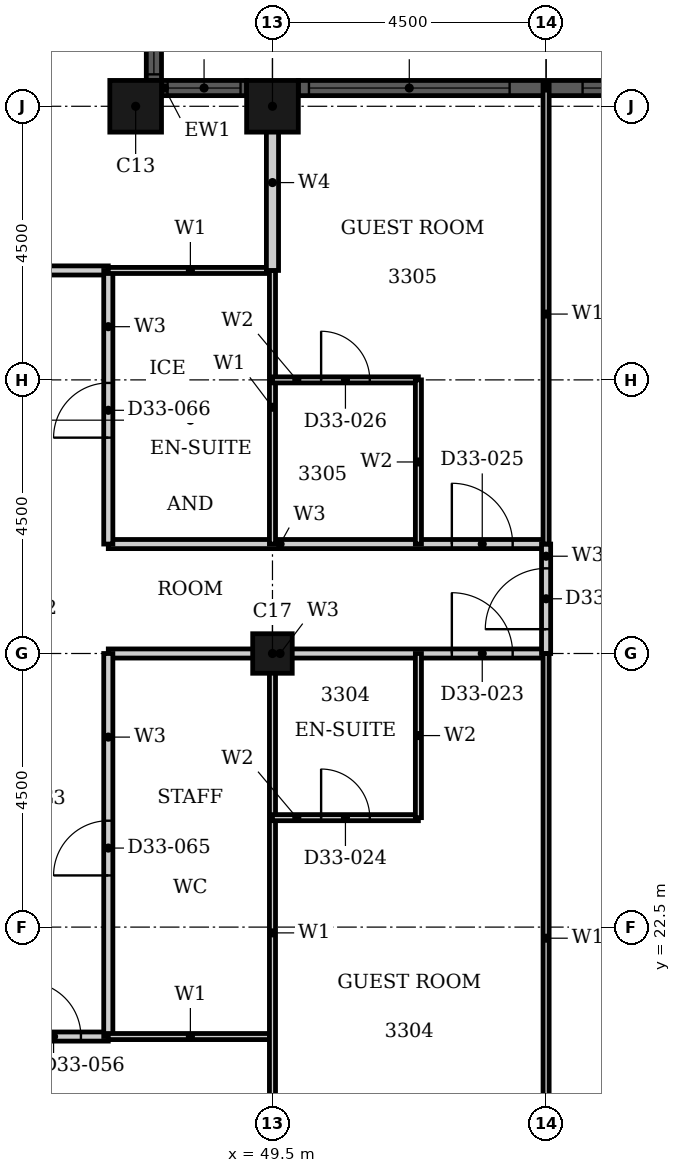
"""IFC4 building model, lengths in metres.
Left out: names, types, materials, properties, quantities, classifications, styles, units other than length and angle.
Written with IfcOpenShell. Run it as: python <this file> out.ifc"""

import sys

from ifc_helpers import new_model, si_unit, direction, frame, frame_2d, origin, origin_2d, place, context, subcontext, project, spatial, rectangle, hollow_rectangle, extrude, element, fill, save


model = new_model("IFC4")
c1 = context("Model", 3, precision=1e-05, world=origin(), true_north=direction((0.0, 1.0)))
c2 = subcontext(c1, "Body", "Model", "MODEL_VIEW")
j1 = project(units=[si_unit("LENGTHUNIT", "METRE"), si_unit("PLANEANGLEUNIT", "RADIAN")], contexts=[c1])
p1 = place(None, origin())
s1 = spatial("IfcSite", under=j1, at=p1, CompositionType="ELEMENT")
p2 = place(p1, origin())
s2 = spatial("IfcBuilding", under=s1, at=p2, CompositionType="ELEMENT")
p3 = place(p2, frame((0.0, 0.0, 133.2)))
s3 = spatial("IfcBuildingStorey", under=s2, at=p3, CompositionType="ELEMENT", Elevation=133.2)
for number, where, z_axis, x_axis in (
    (1, (49.5, 36.0, 0.0), (0.0, 0.0, 1.0), (1.0, 0.0, 0.0)),
    (2, (47.25, 36.0, 0.0), (0.0, 0.0, 1.0), (1.0, 0.0, 0.0)),
):
    element("IfcColumn", number, at=place(p3, frame(where, z_axis=z_axis, x_axis=x_axis)), inside=s3, PredefinedType="COLUMN", context=c2, shape_type="SweptSolid", body=[
        extrude(hollow_rectangle(XDim=0.85, YDim=0.85, WallThickness=0.026, at=origin_2d()), origin(), (0.0, 0.0, 1.0), 3.6),
    ])
p4 = place(p3, frame((49.5, 27.0, 0.0), z_axis=(0.0, 0.0, 1.0), x_axis=(1.0, 0.0, 0.0)))
e3 = element("IfcColumn", 3, at=p4, inside=s3, PredefinedType="COLUMN", context=c2, shape_type="SweptSolid", body=[
    extrude(hollow_rectangle(XDim=0.65, YDim=0.65, WallThickness=0.021, at=origin_2d()), origin(), (0.0, 0.0, 1.0), 3.6),
])
p5 = place(p3, frame((58.075, 36.3, 0.0), z_axis=(0.0, 0.0, 1.0), x_axis=(-1.0, 0.0, 0.0)))
e4 = element("IfcWall", 4, at=p5, inside=s3, PredefinedType="SOLIDWALL", context=c2, shape_type="SweptSolid", body=[
    extrude(rectangle(XDim=8.15, YDim=0.25, at=frame_2d((4.075, 0.0))), origin(), (0.0, 0.0, 1.0), 3.6),
])
p6 = place(p5, frame((0.175, 0.0, 0.9)))
e5 = element("IfcOpeningElement", 5, at=p6, cuts=e4, PredefinedType="OPENING", context=c2, shape_type="SweptSolid", body=[
    extrude(rectangle(XDim=3.3, YDim=2.08, at=frame_2d((1.65, 1.04))), frame((0.0, 0.135, 0.0), z_axis=(0.0, -1.0, 0.0), x_axis=(1.0, 0.0, 0.0)), (0.0, 0.0, 1.0), 0.27),
])
p7 = place(p5, frame((4.675, 0.0, 0.9)))
e6 = element("IfcOpeningElement", 6, at=p7, cuts=e4, PredefinedType="OPENING", context=c2, shape_type="SweptSolid", body=[
    extrude(rectangle(XDim=3.3, YDim=2.08, at=frame_2d((1.65, 1.04))), frame((0.0, 0.135, 0.0), z_axis=(0.0, -1.0, 0.0), x_axis=(1.0, 0.0, 0.0)), (0.0, 0.0, 1.0), 0.27),
])
p8 = place(p3, frame((49.075, 36.3, 0.0), z_axis=(0.0, 0.0, 1.0), x_axis=(-1.0, 0.0, 0.0)))
e7 = element("IfcWall", 7, at=p8, inside=s3, PredefinedType="SOLIDWALL", context=c2, shape_type="SweptSolid", body=[
    extrude(rectangle(XDim=1.4, YDim=0.25, at=frame_2d((0.7, 0.0))), origin(), (0.0, 0.0, 1.0), 3.6),
])
p9 = place(p8, frame((0.1, 0.0, 0.9)))
e8 = element("IfcOpeningElement", 8, at=p9, cuts=e7, PredefinedType="OPENING", context=c2, shape_type="SweptSolid", body=[
    extrude(rectangle(XDim=1.2, YDim=2.08, at=frame_2d((0.6, 1.04))), frame((0.0, 0.135, 0.0), z_axis=(0.0, -1.0, 0.0), x_axis=(1.0, 0.0, 0.0)), (0.0, 0.0, 1.0), 0.27),
])
p10 = place(p3, frame((47.55, 36.425, 0.0), z_axis=(0.0, 0.0, 1.0), x_axis=(0.0, 1.0, 0.0)))
e9 = element("IfcWall", 9, at=p10, inside=s3, PredefinedType="SOLIDWALL", context=c2, shape_type="SweptSolid", body=[
    extrude(rectangle(XDim=1.4, YDim=0.25, at=frame_2d((0.7, 0.0))), origin(), (0.0, 0.0, 1.0), 3.6),
])
p11 = place(p10, frame((0.1, 0.0, 0.9)))
e10 = element("IfcOpeningElement", 10, at=p11, cuts=e9, PredefinedType="OPENING", context=c2, shape_type="SweptSolid", body=[
    extrude(rectangle(XDim=1.2, YDim=2.08, at=frame_2d((0.6, 1.04))), frame((0.0, 0.135, 0.0), z_axis=(0.0, -1.0, 0.0), x_axis=(1.0, 0.0, 0.0)), (0.0, 0.0, 1.0), 0.27),
])
p12 = place(p3, frame((31.5, 20.7, 0.0), z_axis=(0.0, 0.0, 1.0), x_axis=(1.0, 0.0, 0.0)))
e11 = element("IfcWall", 11, at=p12, inside=s3, PredefinedType="PARTITIONING", context=c2, shape_type="SweptSolid", body=[
    extrude(rectangle(XDim=15.3, YDim=0.15, at=frame_2d((7.65, 0.0))), origin(), (0.0, 0.0, 1.0), 3.3),
])
p13 = place(p12, frame((11.95, 0.0, 0.0)))
e12 = element("IfcOpeningElement", 12, at=p13, cuts=e11, PredefinedType="OPENING", context=c2, shape_type="SweptSolid", body=[
    extrude(rectangle(XDim=1.0, YDim=2.1, at=frame_2d((0.5, 1.05))), frame((0.0, 0.085, 0.0), z_axis=(0.0, -1.0, 0.0), x_axis=(1.0, 0.0, 0.0)), (0.0, 0.0, 1.0), 0.17),
])
p14 = place(p12, frame((13.95, 0.0, 0.0)))
e13 = element("IfcOpeningElement", 13, at=p14, cuts=e11, PredefinedType="OPENING", context=c2, shape_type="SweptSolid", body=[
    extrude(rectangle(XDim=0.9, YDim=2.1, at=frame_2d((0.45, 1.05))), frame((0.0, 0.085, 0.0), z_axis=(0.0, -1.0, 0.0), x_axis=(1.0, 0.0, 0.0)), (0.0, 0.0, 1.0), 0.17),
])
p15 = place(p12, frame((1.05, 0.0, 0.0)))
e14 = element("IfcOpeningElement", 14, at=p15, cuts=e11, PredefinedType="OPENING", context=c2, shape_type="SweptSolid", body=[
    extrude(rectangle(XDim=0.9, YDim=2.1, at=frame_2d((0.45, 1.05))), frame((0.0, 0.085, 0.0), z_axis=(0.0, -1.0, 0.0), x_axis=(1.0, 0.0, 0.0)), (0.0, 0.0, 1.0), 0.17),
])
p16 = place(p12, frame((5.55, 0.0, 0.0)))
e15 = element("IfcOpeningElement", 15, at=p16, cuts=e11, PredefinedType="OPENING", context=c2, shape_type="SweptSolid", body=[
    extrude(rectangle(XDim=0.9, YDim=2.1, at=frame_2d((0.45, 1.05))), frame((0.0, 0.085, 0.0), z_axis=(0.0, -1.0, 0.0), x_axis=(1.0, 0.0, 0.0)), (0.0, 0.0, 1.0), 0.17),
])
p17 = place(p3, frame((46.8, 27.0, 0.0), z_axis=(0.0, 0.0, 1.0), x_axis=(1.0, 0.0, 0.0)))
e16 = element("IfcWall", 16, at=p17, inside=s3, PredefinedType="PARTITIONING", context=c2, shape_type="SweptSolid", body=[
    extrude(rectangle(XDim=7.2, YDim=0.15, at=frame_2d((3.6, 0.0))), origin(), (0.0, 0.0, 1.0), 2.58),
])
p18 = place(p17, frame((5.65, 0.0, 0.0)))
e17 = element("IfcOpeningElement", 17, at=p18, cuts=e16, PredefinedType="OPENING", context=c2, shape_type="SweptSolid", body=[
    extrude(rectangle(XDim=1.0, YDim=2.1, at=frame_2d((0.5, 1.05))), frame((0.0, 0.085, 0.0), z_axis=(0.0, -1.0, 0.0), x_axis=(1.0, 0.0, 0.0)), (0.0, 0.0, 1.0), 0.17),
])
p19 = place(p3, frame((46.8, 28.8, 0.0), z_axis=(0.0, 0.0, 1.0), x_axis=(1.0, 0.0, 0.0)))
e18 = element("IfcWall", 18, at=p19, inside=s3, PredefinedType="PARTITIONING", context=c2, shape_type="SweptSolid", body=[
    extrude(rectangle(XDim=7.2, YDim=0.15, at=frame_2d((3.6, 0.0))), origin(), (0.0, 0.0, 1.0), 3.3),
])
p20 = place(p19, frame((5.65, 0.0, 0.0)))
e19 = element("IfcOpeningElement", 19, at=p20, cuts=e18, PredefinedType="OPENING", context=c2, shape_type="SweptSolid", body=[
    extrude(rectangle(XDim=1.0, YDim=2.1, at=frame_2d((0.5, 1.05))), frame((0.0, 0.085, 0.0), z_axis=(0.0, -1.0, 0.0), x_axis=(1.0, 0.0, 0.0)), (0.0, 0.0, 1.0), 0.17),
])
p21 = place(p3, frame((33.3, 33.3, 0.0), z_axis=(0.0, 0.0, 1.0), x_axis=(1.0, 0.0, 0.0)))
e20 = element("IfcWall", 20, at=p21, inside=s3, PredefinedType="PARTITIONING", context=c2, shape_type="SweptSolid", body=[
    extrude(rectangle(XDim=13.5, YDim=0.15, at=frame_2d((6.75, 0.0))), origin(), (0.0, 0.0, 1.0), 3.3),
])
p22 = place(p21, frame((10.15, 0.0, 0.0)))
e21 = element("IfcOpeningElement", 21, at=p22, cuts=e20, PredefinedType="OPENING", context=c2, shape_type="SweptSolid", body=[
    extrude(rectangle(XDim=1.0, YDim=2.1, at=frame_2d((0.5, 1.05))), frame((0.0, 0.085, 0.0), z_axis=(0.0, -1.0, 0.0), x_axis=(1.0, 0.0, 0.0)), (0.0, 0.0, 1.0), 0.17),
])
p23 = place(p21, frame((0.75, 0.0, 0.0)))
e22 = element("IfcOpeningElement", 22, at=p23, cuts=e20, PredefinedType="OPENING", context=c2, shape_type="SweptSolid", body=[
    extrude(rectangle(XDim=0.9, YDim=2.1, at=frame_2d((0.45, 1.05))), frame((0.0, 0.085, 0.0), z_axis=(0.0, -1.0, 0.0), x_axis=(1.0, 0.0, 0.0)), (0.0, 0.0, 1.0), 0.17),
])
p24 = place(p21, frame((4.35, 0.0, 0.0)))
e23 = element("IfcOpeningElement", 23, at=p24, cuts=e20, PredefinedType="OPENING", context=c2, shape_type="SweptSolid", body=[
    extrude(rectangle(XDim=0.9, YDim=2.1, at=frame_2d((0.45, 1.05))), frame((0.0, 0.085, 0.0), z_axis=(0.0, -1.0, 0.0), x_axis=(1.0, 0.0, 0.0)), (0.0, 0.0, 1.0), 0.17),
])
p25 = place(p3, frame((46.8, 28.8, 0.0), z_axis=(0.0, 0.0, 1.0), x_axis=(0.0, 1.0, 0.0)))
e24 = element("IfcWall", 24, at=p25, inside=s3, PredefinedType="PARTITIONING", context=c2, shape_type="SweptSolid", body=[
    extrude(rectangle(XDim=4.5, YDim=0.15, at=frame_2d((2.25, 0.0))), origin(), (0.0, 0.0, 1.0), 3.3),
])
p26 = place(p25, frame((1.75, 0.0, 0.0)))
e25 = element("IfcOpeningElement", 25, at=p26, cuts=e24, PredefinedType="OPENING", context=c2, shape_type="SweptSolid", body=[
    extrude(rectangle(XDim=0.9, YDim=2.1, at=frame_2d((0.45, 1.05))), frame((0.0, 0.085, 0.0), z_axis=(0.0, -1.0, 0.0), x_axis=(1.0, 0.0, 0.0)), (0.0, 0.0, 1.0), 0.17),
])
p27 = place(p3, frame((46.8, 20.7, 0.0), z_axis=(0.0, 0.0, 1.0), x_axis=(0.0, 1.0, 0.0)))
e26 = element("IfcWall", 26, at=p27, inside=s3, PredefinedType="PARTITIONING", context=c2, shape_type="SweptSolid", body=[
    extrude(rectangle(XDim=6.3, YDim=0.15, at=frame_2d((3.15, 0.0))), origin(), (0.0, 0.0, 1.0), 3.3),
])
p28 = place(p27, frame((2.65, 0.0, 0.0)))
e27 = element("IfcOpeningElement", 27, at=p28, cuts=e26, PredefinedType="OPENING", context=c2, shape_type="SweptSolid", body=[
    extrude(rectangle(XDim=0.9, YDim=2.1, at=frame_2d((0.45, 1.05))), frame((0.0, 0.085, 0.0), z_axis=(0.0, -1.0, 0.0), x_axis=(1.0, 0.0, 0.0)), (0.0, 0.0, 1.0), 0.17),
])
p29 = place(p3, frame((54.0, 27.0, 0.0), z_axis=(0.0, 0.0, 1.0), x_axis=(0.0, 1.0, 0.0)))
e28 = element("IfcWall", 28, at=p29, inside=s3, PredefinedType="PARTITIONING", context=c2, shape_type="SweptSolid", body=[
    extrude(rectangle(XDim=1.8, YDim=0.15, at=frame_2d((0.9, 0.0))), origin(), (0.0, 0.0, 1.0), 3.3),
])
p30 = place(p29, frame((0.4, 0.0, 0.0)))
e29 = element("IfcOpeningElement", 29, at=p30, cuts=e28, PredefinedType="OPENING", context=c2, shape_type="SweptSolid", body=[
    extrude(rectangle(XDim=1.0, YDim=2.1, at=frame_2d((0.5, 1.05))), frame((0.0, 0.085, 0.0), z_axis=(0.0, -1.0, 0.0), x_axis=(1.0, 0.0, 0.0)), (0.0, 0.0, 1.0), 0.17),
])
for number, where, z_axis, x_axis in (
    (30, (46.8, 20.7, 0.0), (0.0, 0.0, 1.0), (1.0, 0.0, 0.0)),
    (31, (46.8, 33.3, 0.0), (0.0, 0.0, 1.0), (1.0, 0.0, 0.0)),
):
    element("IfcWall", number, at=place(p3, frame(where, z_axis=z_axis, x_axis=x_axis)), inside=s3, PredefinedType="PARTITIONING", context=c2, shape_type="SweptSolid", body=[
        extrude(rectangle(XDim=2.7, YDim=0.1, at=frame_2d((1.35, 0.0))), origin(), (0.0, 0.0, 1.0), 3.3),
    ])
p31 = place(p3, frame((49.5, 28.8, 0.0), z_axis=(0.0, 0.0, 1.0), x_axis=(0.0, 1.0, 0.0)))
e32 = element("IfcWall", 32, at=p31, inside=s3, PredefinedType="PARTITIONING", context=c2, shape_type="SweptSolid", body=[
    extrude(rectangle(XDim=4.5, YDim=0.1, at=frame_2d((2.25, 0.0))), origin(), (0.0, 0.0, 1.0), 2.38),
])
p32 = place(p3, frame((49.5, 17.81, 0.0), z_axis=(0.0, 0.0, 1.0), x_axis=(0.0, 1.0, 0.0)))
e33 = element("IfcWall", 33, at=p32, inside=s3, PredefinedType="PARTITIONING", context=c2, shape_type="SweptSolid", body=[
    extrude(rectangle(XDim=9.19, YDim=0.1, at=frame_2d((4.595, 0.0))), origin(), (0.0, 0.0, 1.0), 2.38),
])
p33 = place(p3, frame((54.0, 28.8, 0.0), z_axis=(0.0, 0.0, 1.0), x_axis=(0.0, 1.0, 0.0)))
e34 = element("IfcWall", 34, at=p33, inside=s3, PredefinedType="PARTITIONING", context=c2, shape_type="SweptSolid", body=[
    extrude(rectangle(XDim=7.565, YDim=0.1, at=frame_2d((3.782, 0.0))), origin(), (0.0, 0.0, 1.0), 3.3),
])
p34 = place(p3, frame((54.0, 17.635, 0.0), z_axis=(0.0, 0.0, 1.0), x_axis=(0.0, 1.0, 0.0)))
e35 = element("IfcWall", 35, at=p34, inside=s3, PredefinedType="PARTITIONING", context=c2, shape_type="SweptSolid", body=[
    extrude(rectangle(XDim=9.365, YDim=0.1, at=frame_2d((4.683, 0.0))), origin(), (0.0, 0.0, 1.0), 3.3),
])
p35 = place(p3, frame((49.5, 33.3, 0.0), z_axis=(0.0, 0.0, 1.0), x_axis=(0.0, 1.0, 0.0)))
e36 = element("IfcWall", 36, at=p35, inside=s3, PredefinedType="PARTITIONING", context=c2, shape_type="SweptSolid", body=[
    extrude(rectangle(XDim=2.89, YDim=0.2, at=frame_2d((1.445, 0.0))), origin(), (0.0, 0.0, 1.0), 2.38),
])
p36 = place(p3, frame((49.5, 24.3, 0.0), z_axis=(0.0, 0.0, 1.0), x_axis=(1.0, 0.0, 0.0)))
e37 = element("IfcWall", 37, at=p36, inside=s3, PredefinedType="PARTITIONING", context=c2, shape_type="SweptSolid", body=[
    extrude(rectangle(XDim=2.4, YDim=0.1, at=frame_2d((1.2, 0.0))), origin(), (0.0, 0.0, 1.0), 3.3),
])
p37 = place(p36, frame((0.8, 0.0, 0.0)))
e38 = element("IfcOpeningElement", 38, at=p37, cuts=e37, PredefinedType="OPENING", context=c2, shape_type="SweptSolid", body=[
    extrude(rectangle(XDim=0.8, YDim=2.1, at=frame_2d((0.4, 1.05))), frame((0.0, 0.06, 0.0), z_axis=(0.0, -1.0, 0.0), x_axis=(1.0, 0.0, 0.0)), (0.0, 0.0, 1.0), 0.12),
])
p38 = place(p3, frame((49.5, 31.5, 0.0), z_axis=(0.0, 0.0, 1.0), x_axis=(1.0, 0.0, 0.0)))
e39 = element("IfcWall", 39, at=p38, inside=s3, PredefinedType="PARTITIONING", context=c2, shape_type="SweptSolid", body=[
    extrude(rectangle(XDim=2.4, YDim=0.1, at=frame_2d((1.2, 0.0))), origin(), (0.0, 0.0, 1.0), 2.58),
])
p39 = place(p38, frame((0.8, 0.0, 0.0)))
e40 = element("IfcOpeningElement", 40, at=p39, cuts=e39, PredefinedType="OPENING", context=c2, shape_type="SweptSolid", body=[
    extrude(rectangle(XDim=0.8, YDim=2.1, at=frame_2d((0.4, 1.05))), frame((0.0, 0.06, 0.0), z_axis=(0.0, -1.0, 0.0), x_axis=(1.0, 0.0, 0.0)), (0.0, 0.0, 1.0), 0.12),
])
for number, where, z_axis, x_axis in (
    (41, (51.9, 28.8, 0.0), (0.0, 0.0, 1.0), (0.0, 1.0, 0.0)),
    (42, (51.9, 24.3, 0.0), (0.0, 0.0, 1.0), (0.0, 1.0, 0.0)),
):
    element("IfcWall", number, at=place(p3, frame(where, z_axis=z_axis, x_axis=x_axis)), inside=s3, PredefinedType="PARTITIONING", context=c2, shape_type="SweptSolid", body=[
        extrude(rectangle(XDim=2.7, YDim=0.1, at=frame_2d((1.35, 0.0))), origin(), (0.0, 0.0, 1.0), 3.3),
    ])
p40 = place(p6, origin())
e43 = element("IfcWindow", 43, at=p40, inside=s3, PartitioningType="SINGLE_PANEL", PredefinedType="WINDOW", context=c2, shape_type="SweptSolid", body=[
    extrude(rectangle(XDim=3.3, YDim=2.08, at=frame_2d((1.65, 1.04))), frame((0.0, 0.03, 0.0), z_axis=(0.0, -1.0, 0.0), x_axis=(1.0, 0.0, 0.0)), (0.0, 0.0, 1.0), 0.06),
])
fill(e5, e43)
p41 = place(p7, origin())
e44 = element("IfcWindow", 44, at=p41, inside=s3, PartitioningType="SINGLE_PANEL", PredefinedType="WINDOW", context=c2, shape_type="SweptSolid", body=[
    extrude(rectangle(XDim=3.3, YDim=2.08, at=frame_2d((1.65, 1.04))), frame((0.0, 0.03, 0.0), z_axis=(0.0, -1.0, 0.0), x_axis=(1.0, 0.0, 0.0)), (0.0, 0.0, 1.0), 0.06),
])
fill(e6, e44)
p42 = place(p9, origin())
e45 = element("IfcWindow", 45, at=p42, inside=s3, PartitioningType="SINGLE_PANEL", PredefinedType="WINDOW", context=c2, shape_type="SweptSolid", body=[
    extrude(rectangle(XDim=1.2, YDim=2.08, at=frame_2d((0.6, 1.04))), frame((0.0, 0.03, 0.0), z_axis=(0.0, -1.0, 0.0), x_axis=(1.0, 0.0, 0.0)), (0.0, 0.0, 1.0), 0.06),
])
fill(e8, e45)
p43 = place(p11, origin())
e46 = element("IfcWindow", 46, at=p43, inside=s3, PartitioningType="SINGLE_PANEL", PredefinedType="WINDOW", context=c2, shape_type="SweptSolid", body=[
    extrude(rectangle(XDim=1.2, YDim=2.08, at=frame_2d((0.6, 1.04))), frame((0.0, 0.03, 0.0), z_axis=(0.0, -1.0, 0.0), x_axis=(1.0, 0.0, 0.0)), (0.0, 0.0, 1.0), 0.06),
])
fill(e10, e46)
p44 = place(p18, origin())
e47 = element("IfcDoor", 47, at=p44, inside=s3, OperationType="SINGLE_SWING_RIGHT", PredefinedType="DOOR", context=c2, shape_type="SweptSolid", body=[
    extrude(rectangle(XDim=1.0, YDim=2.1, at=frame_2d((0.5, 1.05))), frame((0.0, 0.025, 0.0), z_axis=(0.0, -1.0, 0.0), x_axis=(1.0, 0.0, 0.0)), (0.0, 0.0, 1.0), 0.05),
])
fill(e17, e47)
p45 = place(p37, origin())
e48 = element("IfcDoor", 48, at=p45, inside=s3, OperationType="SINGLE_SWING_LEFT", PredefinedType="DOOR", context=c2, shape_type="SweptSolid", body=[
    extrude(rectangle(XDim=0.8, YDim=2.1, at=frame_2d((0.4, 1.05))), frame((0.0, 0.025, 0.0), z_axis=(0.0, -1.0, 0.0), x_axis=(1.0, 0.0, 0.0)), (0.0, 0.0, 1.0), 0.05),
])
fill(e38, e48)
p46 = place(p20, origin())
e49 = element("IfcDoor", 49, at=p46, inside=s3, OperationType="SINGLE_SWING_RIGHT", PredefinedType="DOOR", context=c2, shape_type="SweptSolid", body=[
    extrude(rectangle(XDim=1.0, YDim=2.1, at=frame_2d((0.5, 1.05))), frame((0.0, 0.025, 0.0), z_axis=(0.0, -1.0, 0.0), x_axis=(1.0, 0.0, 0.0)), (0.0, 0.0, 1.0), 0.05),
])
fill(e19, e49)
p47 = place(p39, origin())
e50 = element("IfcDoor", 50, at=p47, inside=s3, OperationType="SINGLE_SWING_LEFT", PredefinedType="DOOR", context=c2, shape_type="SweptSolid", body=[
    extrude(rectangle(XDim=0.8, YDim=2.1, at=frame_2d((0.4, 1.05))), frame((0.0, 0.025, 0.0), z_axis=(0.0, -1.0, 0.0), x_axis=(1.0, 0.0, 0.0)), (0.0, 0.0, 1.0), 0.05),
])
fill(e40, e50)
p48 = place(p30, origin())
e51 = element("IfcDoor", 51, at=p48, inside=s3, OperationType="SINGLE_SWING_RIGHT", PredefinedType="DOOR", context=c2, shape_type="SweptSolid", body=[
    extrude(rectangle(XDim=1.0, YDim=2.1, at=frame_2d((0.5, 1.05))), frame((0.0, 0.025, 0.0), z_axis=(0.0, -1.0, 0.0), x_axis=(1.0, 0.0, 0.0)), (0.0, 0.0, 1.0), 0.05),
])
fill(e29, e51)
p49 = place(p14, origin())
e52 = element("IfcDoor", 52, at=p49, inside=s3, OperationType="SINGLE_SWING_RIGHT", PredefinedType="DOOR", context=c2, shape_type="SweptSolid", body=[
    extrude(rectangle(XDim=0.9, YDim=2.1, at=frame_2d((0.45, 1.05))), frame((0.0, 0.025, 0.0), z_axis=(0.0, -1.0, 0.0), x_axis=(1.0, 0.0, 0.0)), (0.0, 0.0, 1.0), 0.05),
])
fill(e13, e52)
p50 = place(p28, origin())
e53 = element("IfcDoor", 53, at=p50, inside=s3, OperationType="SINGLE_SWING_LEFT", PredefinedType="DOOR", context=c2, shape_type="SweptSolid", body=[
    extrude(rectangle(XDim=0.9, YDim=2.1, at=frame_2d((0.45, 1.05))), frame((0.0, 0.025, 0.0), z_axis=(0.0, -1.0, 0.0), x_axis=(1.0, 0.0, 0.0)), (0.0, 0.0, 1.0), 0.05),
])
fill(e27, e53)
p51 = place(p26, origin())
e54 = element("IfcDoor", 54, at=p51, inside=s3, OperationType="SINGLE_SWING_RIGHT", PredefinedType="DOOR", context=c2, shape_type="SweptSolid", body=[
    extrude(rectangle(XDim=0.9, YDim=2.1, at=frame_2d((0.45, 1.05))), frame((0.0, 0.025, 0.0), z_axis=(0.0, -1.0, 0.0), x_axis=(1.0, 0.0, 0.0)), (0.0, 0.0, 1.0), 0.05),
])
fill(e25, e54)
save(model, sys.argv[1])
